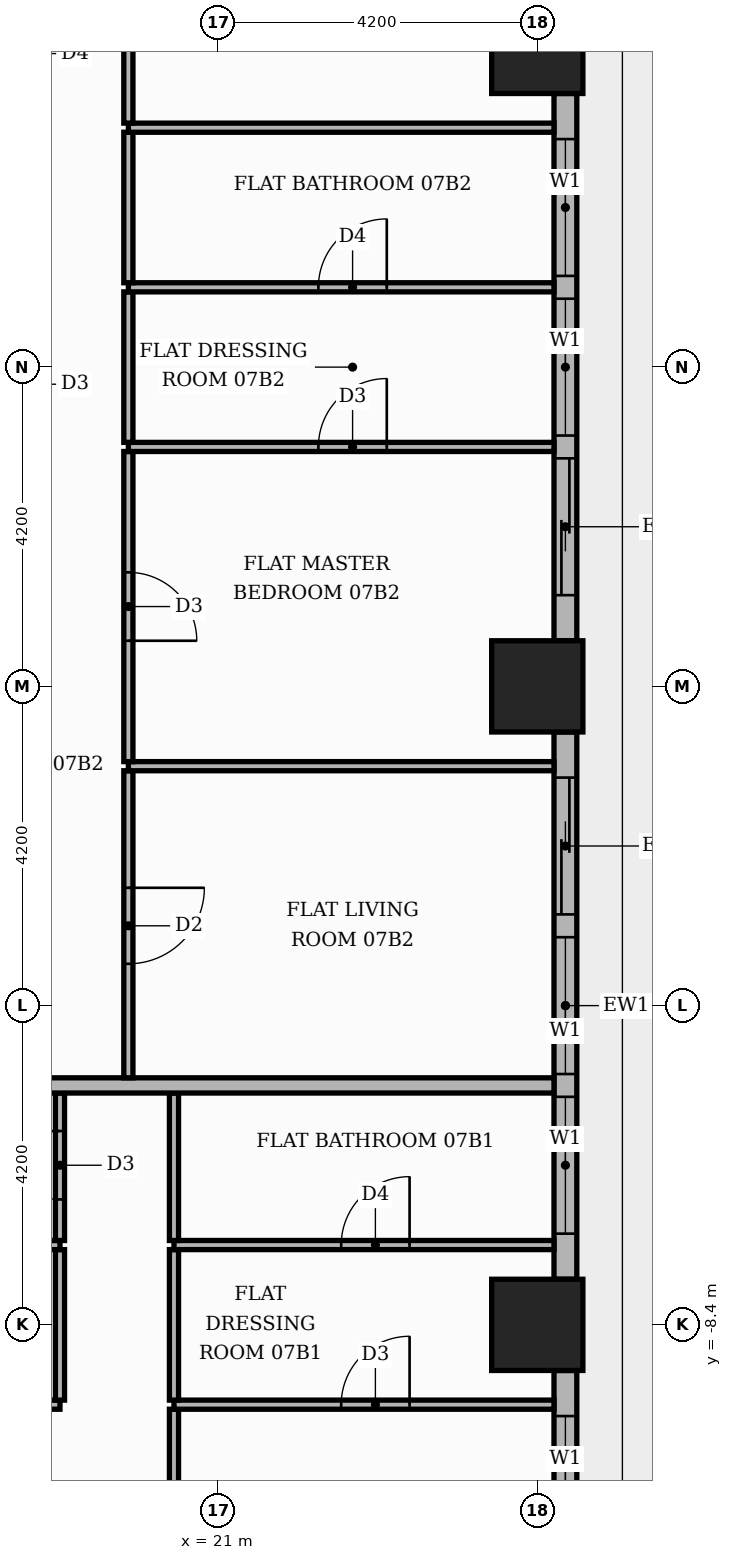
"""IFC4 building model, lengths in metres.
Left out: names, types, materials, properties, quantities, classifications, styles, units other than length and angle.
Written with IfcOpenShell. Run it as: python <this file> out.ifc"""

import sys

from ifc_helpers import new_model, si_unit, direction, frame, frame_2d, origin, origin_2d, place, context, subcontext, project, spatial, rectangle, extrude, element, fill, save


model = new_model("IFC4")
c1 = context("Model", 3, precision=1e-05, world=origin(), true_north=direction((0.0, 1.0)))
c2 = subcontext(c1, "Body", "Model", "MODEL_VIEW")
j1 = project(units=[si_unit("LENGTHUNIT", "METRE"), si_unit("PLANEANGLEUNIT", "RADIAN")], contexts=[c1])
p1 = place(None, origin())
s1 = spatial("IfcSite", under=j1, at=p1, CompositionType="ELEMENT")
p2 = place(p1, origin())
s2 = spatial("IfcBuilding", under=s1, at=p2, CompositionType="ELEMENT")
p3 = place(p2, frame((0.0, 0.0, 34.8)))
s3 = spatial("IfcBuildingStorey", under=s2, at=p3, CompositionType="ELEMENT", Elevation=34.8)
for number, where, z_axis, x_axis in (
    (1, (25.2, 0.0, 0.0), (0.0, 0.0, 1.0), (1.0, 0.0, 0.0)),
    (2, (25.2, 8.4, 0.0), (0.0, 0.0, 1.0), (1.0, 0.0, 0.0)),
    (3, (25.2, -8.4, 0.0), (0.0, 0.0, 1.0), (1.0, 0.0, 0.0)),
):
    element("IfcColumn", number, at=place(p3, frame(where, z_axis=z_axis, x_axis=x_axis)), inside=s3, PredefinedType="COLUMN", context=c2, shape_type="SweptSolid", body=[
        extrude(rectangle(XDim=1.2, YDim=1.2, at=origin_2d()), origin(), (0.0, 0.0, 1.0), 3.9),
    ])
p4 = place(p3, frame((25.57, -16.2, 0.0), z_axis=(0.0, 0.0, 1.0), x_axis=(0.0, 1.0, 0.0)))
e4 = element("IfcWall", 4, at=p4, inside=s3, PredefinedType="STANDARD", context=c2, shape_type="SweptSolid", body=[
    extrude(rectangle(XDim=7.2, YDim=0.3, at=frame_2d((3.6, 0.0))), origin(), (0.0, 0.0, 1.0), 3.48),
])
p5 = place(p4, frame((0.6, 0.0, 0.0)))
e5 = element("IfcOpeningElement", 5, at=p5, cuts=e4, PredefinedType="OPENING", context=c2, shape_type="SweptSolid", body=[
    extrude(rectangle(XDim=1.8, YDim=2.4, at=frame_2d((0.9, 1.2))), frame((0.0, 0.16, 0.0), z_axis=(0.0, -1.0, 0.0), x_axis=(1.0, 0.0, 0.0)), (0.0, 0.0, 1.0), 0.32),
])
p6 = place(p4, frame((2.7, 0.0, 0.0)))
e6 = element("IfcOpeningElement", 6, at=p6, cuts=e4, PredefinedType="OPENING", context=c2, shape_type="SweptSolid", body=[
    extrude(rectangle(XDim=1.8, YDim=2.4, at=frame_2d((0.9, 1.2))), frame((0.0, 0.16, 0.0), z_axis=(0.0, -1.0, 0.0), x_axis=(1.0, 0.0, 0.0)), (0.0, 0.0, 1.0), 0.32),
])
p7 = place(p4, frame((4.8, 0.0, 0.9)))
e7 = element("IfcOpeningElement", 7, at=p7, cuts=e4, PredefinedType="OPENING", context=c2, shape_type="SweptSolid", body=[
    extrude(rectangle(XDim=1.8, YDim=2.1, at=frame_2d((0.9, 1.05))), frame((0.0, 0.16, 0.0), z_axis=(0.0, -1.0, 0.0), x_axis=(1.0, 0.0, 0.0)), (0.0, 0.0, 1.0), 0.32),
])
p8 = place(p3, frame((25.57, -7.8, 0.0), z_axis=(0.0, 0.0, 1.0), x_axis=(0.0, 1.0, 0.0)))
e8 = element("IfcWall", 8, at=p8, inside=s3, PredefinedType="STANDARD", context=c2, shape_type="SweptSolid", body=[
    extrude(rectangle(XDim=7.2, YDim=0.3, at=frame_2d((3.6, 0.0))), origin(), (0.0, 0.0, 1.0), 3.48),
])
p9 = place(p8, frame((0.6, 0.0, 0.9)))
e9 = element("IfcOpeningElement", 9, at=p9, cuts=e8, PredefinedType="OPENING", context=c2, shape_type="SweptSolid", body=[
    extrude(rectangle(XDim=1.8, YDim=2.1, at=frame_2d((0.9, 1.05))), frame((0.0, 0.16, 0.0), z_axis=(0.0, -1.0, 0.0), x_axis=(1.0, 0.0, 0.0)), (0.0, 0.0, 1.0), 0.32),
])
p10 = place(p8, frame((2.7, 0.0, 0.9)))
e10 = element("IfcOpeningElement", 10, at=p10, cuts=e8, PredefinedType="OPENING", context=c2, shape_type="SweptSolid", body=[
    extrude(rectangle(XDim=1.8, YDim=2.1, at=frame_2d((0.9, 1.05))), frame((0.0, 0.16, 0.0), z_axis=(0.0, -1.0, 0.0), x_axis=(1.0, 0.0, 0.0)), (0.0, 0.0, 1.0), 0.32),
])
p11 = place(p8, frame((4.8, 0.0, 0.0)))
e11 = element("IfcOpeningElement", 11, at=p11, cuts=e8, PredefinedType="OPENING", context=c2, shape_type="SweptSolid", body=[
    extrude(rectangle(XDim=1.8, YDim=2.4, at=frame_2d((0.9, 1.2))), frame((0.0, 0.16, 0.0), z_axis=(0.0, -1.0, 0.0), x_axis=(1.0, 0.0, 0.0)), (0.0, 0.0, 1.0), 0.32),
])
p12 = place(p3, frame((25.57, 0.6, 0.0), z_axis=(0.0, 0.0, 1.0), x_axis=(0.0, 1.0, 0.0)))
e12 = element("IfcWall", 12, at=p12, inside=s3, PredefinedType="STANDARD", context=c2, shape_type="SweptSolid", body=[
    extrude(rectangle(XDim=7.2, YDim=0.3, at=frame_2d((3.6, 0.0))), origin(), (0.0, 0.0, 1.0), 3.48),
])
p13 = place(p12, frame((0.6, 0.0, 0.0)))
e13 = element("IfcOpeningElement", 13, at=p13, cuts=e12, PredefinedType="OPENING", context=c2, shape_type="SweptSolid", body=[
    extrude(rectangle(XDim=1.8, YDim=2.4, at=frame_2d((0.9, 1.2))), frame((0.0, 0.16, 0.0), z_axis=(0.0, -1.0, 0.0), x_axis=(1.0, 0.0, 0.0)), (0.0, 0.0, 1.0), 0.32),
])
p14 = place(p12, frame((2.7, 0.0, 0.9)))
e14 = element("IfcOpeningElement", 14, at=p14, cuts=e12, PredefinedType="OPENING", context=c2, shape_type="SweptSolid", body=[
    extrude(rectangle(XDim=1.8, YDim=2.1, at=frame_2d((0.9, 1.05))), frame((0.0, 0.16, 0.0), z_axis=(0.0, -1.0, 0.0), x_axis=(1.0, 0.0, 0.0)), (0.0, 0.0, 1.0), 0.32),
])
p15 = place(p12, frame((4.8, 0.0, 0.9)))
e15 = element("IfcOpeningElement", 15, at=p15, cuts=e12, PredefinedType="OPENING", context=c2, shape_type="SweptSolid", body=[
    extrude(rectangle(XDim=1.8, YDim=2.1, at=frame_2d((0.9, 1.05))), frame((0.0, 0.16, 0.0), z_axis=(0.0, -1.0, 0.0), x_axis=(1.0, 0.0, 0.0)), (0.0, 0.0, 1.0), 0.32),
])
p16 = place(p3, frame((20.42, -13.59, 0.0), z_axis=(0.0, 0.0, 1.0), x_axis=(0.0, 1.0, 0.0)))
e16 = element("IfcWall", 16, at=p16, inside=s3, PredefinedType="PARTITIONING", context=c2, shape_type="SweptSolid", body=[
    extrude(rectangle(XDim=4.08, YDim=0.12, at=frame_2d((2.04, 0.0))), origin(), (0.0, 0.0, 1.0), 3.48),
])
p17 = place(p16, frame((1.59, 0.0, 0.0)))
e17 = element("IfcOpeningElement", 17, at=p17, cuts=e16, PredefinedType="OPENING", context=c2, shape_type="SweptSolid", body=[
    extrude(rectangle(XDim=0.9, YDim=2.1, at=frame_2d((0.45, 1.05))), frame((0.0, 0.07, 0.0), z_axis=(0.0, -1.0, 0.0), x_axis=(1.0, 0.0, 0.0)), (0.0, 0.0, 1.0), 0.14),
])
p18 = place(p3, frame((13.75, -9.45, 0.0), z_axis=(0.0, 0.0, 1.0), x_axis=(1.0, 0.0, 0.0)))
e18 = element("IfcWall", 18, at=p18, inside=s3, PredefinedType="PARTITIONING", context=c2, shape_type="SweptSolid", body=[
    extrude(rectangle(XDim=5.17, YDim=0.12, at=frame_2d((2.585, 0.0))), origin(), (0.0, 0.0, 1.0), 3.48),
])
p19 = place(p18, frame((2.085, 0.0, 0.0)))
e19 = element("IfcOpeningElement", 19, at=p19, cuts=e18, PredefinedType="OPENING", context=c2, shape_type="SweptSolid", body=[
    extrude(rectangle(XDim=0.9, YDim=2.1, at=frame_2d((0.45, 1.05))), frame((0.0, 0.07, 0.0), z_axis=(0.0, -1.0, 0.0), x_axis=(1.0, 0.0, 0.0)), (0.0, 0.0, 1.0), 0.14),
])
p20 = place(p3, frame((20.42, -9.45, 0.0), z_axis=(0.0, 0.0, 1.0), x_axis=(1.0, 0.0, 0.0)))
e20 = element("IfcWall", 20, at=p20, inside=s3, PredefinedType="PARTITIONING", context=c2, shape_type="SweptSolid", body=[
    extrude(rectangle(XDim=5.0, YDim=0.12, at=frame_2d((2.5, 0.0))), origin(), (0.0, 0.0, 1.0), 3.48),
])
p21 = place(p20, frame((2.2, 0.0, 0.0)))
e21 = element("IfcOpeningElement", 21, at=p21, cuts=e20, PredefinedType="OPENING", context=c2, shape_type="SweptSolid", body=[
    extrude(rectangle(XDim=0.9, YDim=2.1, at=frame_2d((0.45, 1.05))), frame((0.0, 0.07, 0.0), z_axis=(0.0, -1.0, 0.0), x_axis=(1.0, 0.0, 0.0)), (0.0, 0.0, 1.0), 0.14),
])
for number, where, z_axis, x_axis in (
    (22, (18.92, -9.39, 0.0), (0.0, 0.0, 1.0), (0.0, 1.0, 0.0)),
    (23, (20.42, -9.39, 0.0), (0.0, 0.0, 1.0), (0.0, 1.0, 0.0)),
):
    element("IfcWall", number, at=place(p3, frame(where, z_axis=z_axis, x_axis=x_axis)), inside=s3, PredefinedType="PARTITIONING", context=c2, shape_type="SweptSolid", body=[
        extrude(rectangle(XDim=1.98, YDim=0.12, at=frame_2d((0.99, 0.0))), origin(), (0.0, 0.0, 1.0), 3.48),
    ])
p22 = place(p3, frame((13.75, -7.35, 0.0), z_axis=(0.0, 0.0, 1.0), x_axis=(1.0, 0.0, 0.0)))
e24 = element("IfcWall", 24, at=p22, inside=s3, PredefinedType="PARTITIONING", context=c2, shape_type="SweptSolid", body=[
    extrude(rectangle(XDim=5.17, YDim=0.12, at=frame_2d((2.585, 0.0))), origin(), (0.0, 0.0, 1.0), 3.48),
])
p23 = place(p3, frame((20.42, -7.35, 0.0), z_axis=(0.0, 0.0, 1.0), x_axis=(1.0, 0.0, 0.0)))
e25 = element("IfcWall", 25, at=p23, inside=s3, PredefinedType="PARTITIONING", context=c2, shape_type="SweptSolid", body=[
    extrude(rectangle(XDim=5.0, YDim=0.12, at=frame_2d((2.5, 0.0))), origin(), (0.0, 0.0, 1.0), 3.48),
])
p24 = place(p23, frame((2.2, 0.0, 0.0)))
e26 = element("IfcOpeningElement", 26, at=p24, cuts=e25, PredefinedType="OPENING", context=c2, shape_type="SweptSolid", body=[
    extrude(rectangle(XDim=0.9, YDim=2.1, at=frame_2d((0.45, 1.05))), frame((0.0, 0.07, 0.0), z_axis=(0.0, -1.0, 0.0), x_axis=(1.0, 0.0, 0.0)), (0.0, 0.0, 1.0), 0.14),
])
p25 = place(p3, frame((18.92, -7.29, 0.0), z_axis=(0.0, 0.0, 1.0), x_axis=(0.0, 1.0, 0.0)))
e27 = element("IfcWall", 27, at=p25, inside=s3, PredefinedType="PARTITIONING", context=c2, shape_type="SweptSolid", body=[
    extrude(rectangle(XDim=1.94, YDim=0.12, at=frame_2d((0.97, 0.0))), origin(), (0.0, 0.0, 1.0), 3.48),
])
p26 = place(p25, frame((0.54, 0.0, 0.0)))
e28 = element("IfcOpeningElement", 28, at=p26, cuts=e27, PredefinedType="OPENING", context=c2, shape_type="SweptSolid", body=[
    extrude(rectangle(XDim=0.9, YDim=2.1, at=frame_2d((0.45, 1.05))), frame((0.0, 0.07, 0.0), z_axis=(0.0, -1.0, 0.0), x_axis=(1.0, 0.0, 0.0)), (0.0, 0.0, 1.0), 0.14),
])
p27 = place(p3, frame((20.42, -7.29, 0.0), z_axis=(0.0, 0.0, 1.0), x_axis=(0.0, 1.0, 0.0)))
e29 = element("IfcWall", 29, at=p27, inside=s3, PredefinedType="PARTITIONING", context=c2, shape_type="SweptSolid", body=[
    extrude(rectangle(XDim=1.94, YDim=0.12, at=frame_2d((0.97, 0.0))), origin(), (0.0, 0.0, 1.0), 3.48),
])
p28 = place(p3, frame((13.65, -5.25, 0.0), z_axis=(0.0, 0.0, 1.0), x_axis=(1.0, 0.0, 0.0)))
e30 = element("IfcWall", 30, at=p28, inside=s3, PredefinedType="PARTITIONING", context=c2, shape_type="SweptSolid", body=[
    extrude(rectangle(XDim=11.77, YDim=0.2, at=frame_2d((5.885, 0.0))), origin(), (0.0, 0.0, 1.0), 3.48),
])
p29 = place(p3, frame((19.82, -5.15, 0.0), z_axis=(0.0, 0.0, 1.0), x_axis=(0.0, 1.0, 0.0)))
e31 = element("IfcWall", 31, at=p29, inside=s3, PredefinedType="PARTITIONING", context=c2, shape_type="SweptSolid", body=[
    extrude(rectangle(XDim=4.04, YDim=0.12, at=frame_2d((2.02, 0.0))), origin(), (0.0, 0.0, 1.0), 3.48),
])
p30 = place(p29, frame((1.5, 0.0, 0.0)))
e32 = element("IfcOpeningElement", 32, at=p30, cuts=e31, PredefinedType="OPENING", context=c2, shape_type="SweptSolid", body=[
    extrude(rectangle(XDim=1.0, YDim=2.1, at=frame_2d((0.5, 1.05))), frame((0.0, 0.07, 0.0), z_axis=(0.0, -1.0, 0.0), x_axis=(1.0, 0.0, 0.0)), (0.0, 0.0, 1.0), 0.14),
])
p31 = place(p3, frame((19.82, -1.05, 0.0), z_axis=(0.0, 0.0, 1.0), x_axis=(1.0, 0.0, 0.0)))
e33 = element("IfcWall", 33, at=p31, inside=s3, PredefinedType="PARTITIONING", context=c2, shape_type="SweptSolid", body=[
    extrude(rectangle(XDim=5.6, YDim=0.12, at=frame_2d((2.8, 0.0))), origin(), (0.0, 0.0, 1.0), 3.48),
])
p32 = place(p3, frame((19.82, -0.99, 0.0), z_axis=(0.0, 0.0, 1.0), x_axis=(0.0, 1.0, 0.0)))
e34 = element("IfcWall", 34, at=p32, inside=s3, PredefinedType="PARTITIONING", context=c2, shape_type="SweptSolid", body=[
    extrude(rectangle(XDim=4.08, YDim=0.12, at=frame_2d((2.04, 0.0))), origin(), (0.0, 0.0, 1.0), 3.48),
])
p33 = place(p32, frame((1.59, 0.0, 0.0)))
e35 = element("IfcOpeningElement", 35, at=p33, cuts=e34, PredefinedType="OPENING", context=c2, shape_type="SweptSolid", body=[
    extrude(rectangle(XDim=0.9, YDim=2.1, at=frame_2d((0.45, 1.05))), frame((0.0, 0.07, 0.0), z_axis=(0.0, -1.0, 0.0), x_axis=(1.0, 0.0, 0.0)), (0.0, 0.0, 1.0), 0.14),
])
p34 = place(p3, frame((19.82, 3.15, 0.0), z_axis=(0.0, 0.0, 1.0), x_axis=(1.0, 0.0, 0.0)))
e36 = element("IfcWall", 36, at=p34, inside=s3, PredefinedType="PARTITIONING", context=c2, shape_type="SweptSolid", body=[
    extrude(rectangle(XDim=5.6, YDim=0.12, at=frame_2d((2.8, 0.0))), origin(), (0.0, 0.0, 1.0), 3.48),
])
p35 = place(p34, frame((2.5, 0.0, 0.0)))
e37 = element("IfcOpeningElement", 37, at=p35, cuts=e36, PredefinedType="OPENING", context=c2, shape_type="SweptSolid", body=[
    extrude(rectangle(XDim=0.9, YDim=2.1, at=frame_2d((0.45, 1.05))), frame((0.0, 0.07, 0.0), z_axis=(0.0, -1.0, 0.0), x_axis=(1.0, 0.0, 0.0)), (0.0, 0.0, 1.0), 0.14),
])
p36 = place(p3, frame((19.82, 3.21, 0.0), z_axis=(0.0, 0.0, 1.0), x_axis=(0.0, 1.0, 0.0)))
e38 = element("IfcWall", 38, at=p36, inside=s3, PredefinedType="PARTITIONING", context=c2, shape_type="SweptSolid", body=[
    extrude(rectangle(XDim=1.98, YDim=0.12, at=frame_2d((0.99, 0.0))), origin(), (0.0, 0.0, 1.0), 3.48),
])
p37 = place(p3, frame((19.82, 5.25, 0.0), z_axis=(0.0, 0.0, 1.0), x_axis=(1.0, 0.0, 0.0)))
e39 = element("IfcWall", 39, at=p37, inside=s3, PredefinedType="PARTITIONING", context=c2, shape_type="SweptSolid", body=[
    extrude(rectangle(XDim=5.6, YDim=0.12, at=frame_2d((2.8, 0.0))), origin(), (0.0, 0.0, 1.0), 3.48),
])
p38 = place(p37, frame((2.5, 0.0, 0.0)))
e40 = element("IfcOpeningElement", 40, at=p38, cuts=e39, PredefinedType="OPENING", context=c2, shape_type="SweptSolid", body=[
    extrude(rectangle(XDim=0.9, YDim=2.1, at=frame_2d((0.45, 1.05))), frame((0.0, 0.07, 0.0), z_axis=(0.0, -1.0, 0.0), x_axis=(1.0, 0.0, 0.0)), (0.0, 0.0, 1.0), 0.14),
])
p39 = place(p3, frame((19.82, 5.31, 0.0), z_axis=(0.0, 0.0, 1.0), x_axis=(0.0, 1.0, 0.0)))
e41 = element("IfcWall", 41, at=p39, inside=s3, PredefinedType="PARTITIONING", context=c2, shape_type="SweptSolid", body=[
    extrude(rectangle(XDim=1.98, YDim=0.12, at=frame_2d((0.99, 0.0))), origin(), (0.0, 0.0, 1.0), 3.48),
])
p40 = place(p3, frame((19.82, 7.35, 0.0), z_axis=(0.0, 0.0, 1.0), x_axis=(1.0, 0.0, 0.0)))
e42 = element("IfcWall", 42, at=p40, inside=s3, PredefinedType="PARTITIONING", context=c2, shape_type="SweptSolid", body=[
    extrude(rectangle(XDim=5.6, YDim=0.12, at=frame_2d((2.8, 0.0))), origin(), (0.0, 0.0, 1.0), 3.48),
])
p41 = place(p3, frame((19.82, 7.41, 0.0), z_axis=(0.0, 0.0, 1.0), x_axis=(0.0, 1.0, 0.0)))
e43 = element("IfcWall", 43, at=p41, inside=s3, PredefinedType="PARTITIONING", context=c2, shape_type="SweptSolid", body=[
    extrude(rectangle(XDim=4.08, YDim=0.12, at=frame_2d((2.04, 0.0))), origin(), (0.0, 0.0, 1.0), 3.48),
])
p42 = place(p41, frame((1.59, 0.0, 0.0)))
e44 = element("IfcOpeningElement", 44, at=p42, cuts=e43, PredefinedType="OPENING", context=c2, shape_type="SweptSolid", body=[
    extrude(rectangle(XDim=0.9, YDim=2.1, at=frame_2d((0.45, 1.05))), frame((0.0, 0.07, 0.0), z_axis=(0.0, -1.0, 0.0), x_axis=(1.0, 0.0, 0.0)), (0.0, 0.0, 1.0), 0.14),
])
p43 = place(p7, origin())
e45 = element("IfcWindow", 45, at=p43, inside=s3, PartitioningType="SINGLE_PANEL", PredefinedType="WINDOW", context=c2, shape_type="SweptSolid", body=[
    extrude(rectangle(XDim=1.8, YDim=2.1, at=frame_2d((0.9, 1.05))), frame((0.0, 0.03, 0.0), z_axis=(0.0, -1.0, 0.0), x_axis=(1.0, 0.0, 0.0)), (0.0, 0.0, 1.0), 0.06),
])
fill(e7, e45)
p44 = place(p9, origin())
e46 = element("IfcWindow", 46, at=p44, inside=s3, PartitioningType="SINGLE_PANEL", PredefinedType="WINDOW", context=c2, shape_type="SweptSolid", body=[
    extrude(rectangle(XDim=1.8, YDim=2.1, at=frame_2d((0.9, 1.05))), frame((0.0, 0.03, 0.0), z_axis=(0.0, -1.0, 0.0), x_axis=(1.0, 0.0, 0.0)), (0.0, 0.0, 1.0), 0.06),
])
fill(e9, e46)
p45 = place(p10, origin())
e47 = element("IfcWindow", 47, at=p45, inside=s3, PartitioningType="SINGLE_PANEL", PredefinedType="WINDOW", context=c2, shape_type="SweptSolid", body=[
    extrude(rectangle(XDim=1.8, YDim=2.1, at=frame_2d((0.9, 1.05))), frame((0.0, 0.03, 0.0), z_axis=(0.0, -1.0, 0.0), x_axis=(1.0, 0.0, 0.0)), (0.0, 0.0, 1.0), 0.06),
])
fill(e10, e47)
p46 = place(p11, origin())
e48 = element("IfcDoor", 48, at=p46, inside=s3, OperationType="SLIDING_TO_RIGHT", PredefinedType="DOOR", context=c2, shape_type="SweptSolid", body=[
    extrude(rectangle(XDim=1.8, YDim=2.4, at=frame_2d((0.9, 1.2))), frame((0.0, 0.025, 0.0), z_axis=(0.0, -1.0, 0.0), x_axis=(1.0, 0.0, 0.0)), (0.0, 0.0, 1.0), 0.05),
])
fill(e11, e48)
p47 = place(p13, origin())
e49 = element("IfcDoor", 49, at=p47, inside=s3, OperationType="SLIDING_TO_LEFT", PredefinedType="DOOR", context=c2, shape_type="SweptSolid", body=[
    extrude(rectangle(XDim=1.8, YDim=2.4, at=frame_2d((0.9, 1.2))), frame((0.0, 0.025, 0.0), z_axis=(0.0, -1.0, 0.0), x_axis=(1.0, 0.0, 0.0)), (0.0, 0.0, 1.0), 0.05),
])
fill(e13, e49)
p48 = place(p14, origin())
e50 = element("IfcWindow", 50, at=p48, inside=s3, PartitioningType="SINGLE_PANEL", PredefinedType="WINDOW", context=c2, shape_type="SweptSolid", body=[
    extrude(rectangle(XDim=1.8, YDim=2.1, at=frame_2d((0.9, 1.05))), frame((0.0, 0.03, 0.0), z_axis=(0.0, -1.0, 0.0), x_axis=(1.0, 0.0, 0.0)), (0.0, 0.0, 1.0), 0.06),
])
fill(e14, e50)
p49 = place(p15, origin())
e51 = element("IfcWindow", 51, at=p49, inside=s3, PartitioningType="SINGLE_PANEL", PredefinedType="WINDOW", context=c2, shape_type="SweptSolid", body=[
    extrude(rectangle(XDim=1.8, YDim=2.1, at=frame_2d((0.9, 1.05))), frame((0.0, 0.03, 0.0), z_axis=(0.0, -1.0, 0.0), x_axis=(1.0, 0.0, 0.0)), (0.0, 0.0, 1.0), 0.06),
])
fill(e15, e51)
p50 = place(p26, origin())
e52 = element("IfcDoor", 52, at=p50, inside=s3, OperationType="SINGLE_SWING_RIGHT", PredefinedType="DOOR", context=c2, shape_type="SweptSolid", body=[
    extrude(rectangle(XDim=0.9, YDim=2.1, at=frame_2d((0.45, 1.05))), frame((0.0, 0.025, 0.0), z_axis=(0.0, -1.0, 0.0), x_axis=(1.0, 0.0, 0.0)), (0.0, 0.0, 1.0), 0.05),
])
fill(e28, e52)
p51 = place(p21, origin())
e53 = element("IfcDoor", 53, at=p51, inside=s3, OperationType="SINGLE_SWING_RIGHT", PredefinedType="DOOR", context=c2, shape_type="SweptSolid", body=[
    extrude(rectangle(XDim=0.9, YDim=2.1, at=frame_2d((0.45, 1.05))), frame((0.0, 0.025, 0.0), z_axis=(0.0, -1.0, 0.0), x_axis=(1.0, 0.0, 0.0)), (0.0, 0.0, 1.0), 0.05),
])
fill(e21, e53)
p52 = place(p24, origin())
e54 = element("IfcDoor", 54, at=p52, inside=s3, OperationType="SINGLE_SWING_RIGHT", PredefinedType="DOOR", context=c2, shape_type="SweptSolid", body=[
    extrude(rectangle(XDim=0.9, YDim=2.1, at=frame_2d((0.45, 1.05))), frame((0.0, 0.025, 0.0), z_axis=(0.0, -1.0, 0.0), x_axis=(1.0, 0.0, 0.0)), (0.0, 0.0, 1.0), 0.05),
])
fill(e26, e54)
p53 = place(p30, frame((1.0, 0.0, 0.0), z_axis=(0.0, 0.0, 1.0), x_axis=(-1.0, 0.0, 0.0)))
e55 = element("IfcDoor", 55, at=p53, inside=s3, OperationType="SINGLE_SWING_RIGHT", PredefinedType="DOOR", context=c2, shape_type="SweptSolid", body=[
    extrude(rectangle(XDim=1.0, YDim=2.1, at=frame_2d((0.5, 1.05))), frame((0.0, 0.025, 0.0), z_axis=(0.0, -1.0, 0.0), x_axis=(1.0, 0.0, 0.0)), (0.0, 0.0, 1.0), 0.05),
])
fill(e32, e55)
p54 = place(p33, frame((0.9, 0.0, 0.0), z_axis=(0.0, 0.0, 1.0), x_axis=(-1.0, 0.0, 0.0)))
e56 = element("IfcDoor", 56, at=p54, inside=s3, OperationType="SINGLE_SWING_LEFT", PredefinedType="DOOR", context=c2, shape_type="SweptSolid", body=[
    extrude(rectangle(XDim=0.9, YDim=2.1, at=frame_2d((0.45, 1.05))), frame((0.0, 0.025, 0.0), z_axis=(0.0, -1.0, 0.0), x_axis=(1.0, 0.0, 0.0)), (0.0, 0.0, 1.0), 0.05),
])
fill(e35, e56)
p55 = place(p35, origin())
e57 = element("IfcDoor", 57, at=p55, inside=s3, OperationType="SINGLE_SWING_RIGHT", PredefinedType="DOOR", context=c2, shape_type="SweptSolid", body=[
    extrude(rectangle(XDim=0.9, YDim=2.1, at=frame_2d((0.45, 1.05))), frame((0.0, 0.025, 0.0), z_axis=(0.0, -1.0, 0.0), x_axis=(1.0, 0.0, 0.0)), (0.0, 0.0, 1.0), 0.05),
])
fill(e37, e57)
p56 = place(p38, origin())
e58 = element("IfcDoor", 58, at=p56, inside=s3, OperationType="SINGLE_SWING_RIGHT", PredefinedType="DOOR", context=c2, shape_type="SweptSolid", body=[
    extrude(rectangle(XDim=0.9, YDim=2.1, at=frame_2d((0.45, 1.05))), frame((0.0, 0.025, 0.0), z_axis=(0.0, -1.0, 0.0), x_axis=(1.0, 0.0, 0.0)), (0.0, 0.0, 1.0), 0.05),
])
fill(e40, e58)
save(model, sys.argv[1])
